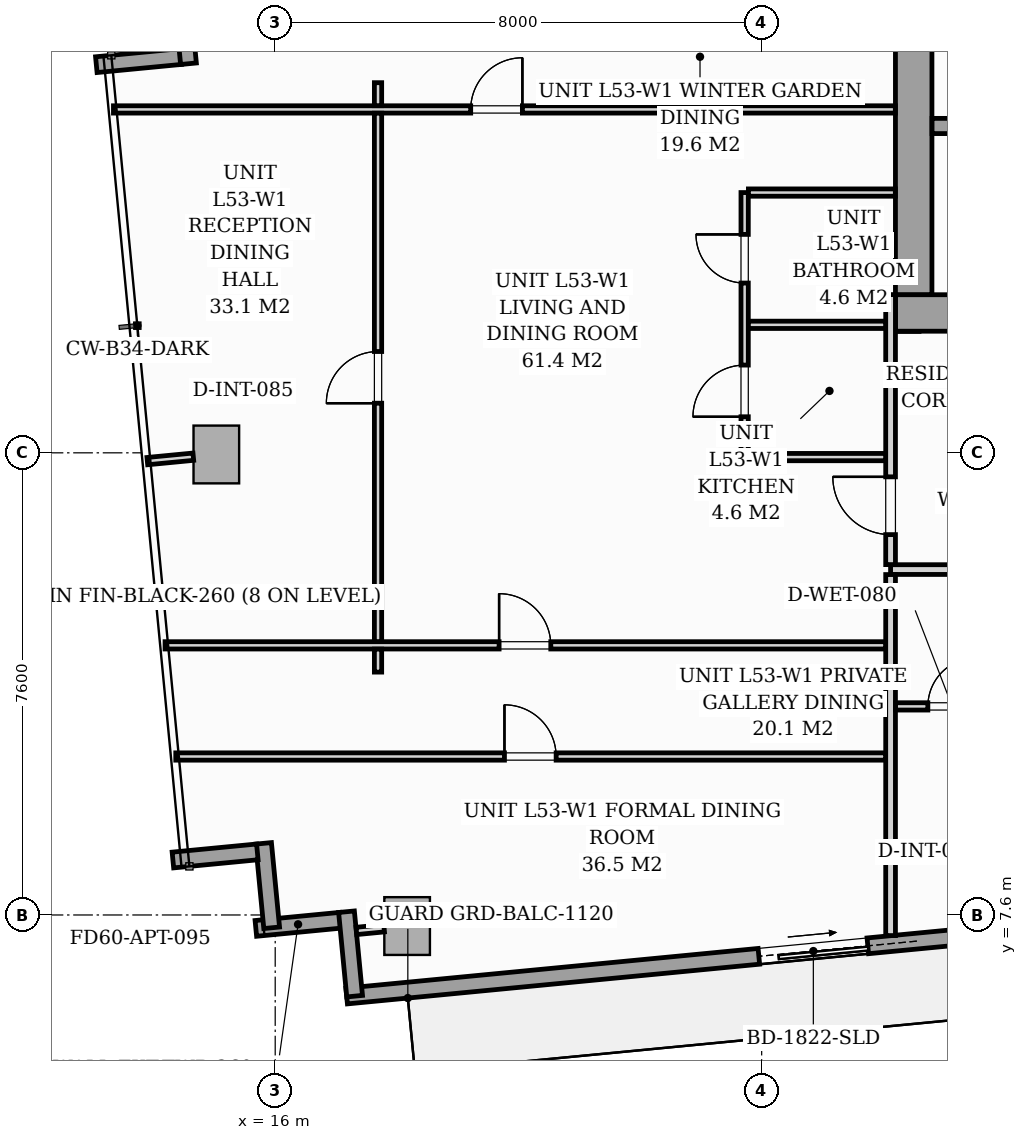
"""IFC4 building model, lengths in metres.
Left out: names, types, materials, properties, quantities, classifications, styles, units other than length and angle.
Written with IfcOpenShell. Run it as: python <this file> out.ifc"""

import sys

from ifc_helpers import new_model, si_unit, direction, frame, frame_2d, origin, origin_2d, place, context, subcontext, project, spatial, rectangle, i_section, extrude, source, transform, mapped, element, fill, save


model = new_model("IFC4")
c1 = context("Model", 3, precision=1e-05, world=origin(), true_north=direction((0.0, 1.0)))
c2 = subcontext(c1, "Body", "Model", "MODEL_VIEW")
j1 = project(units=[si_unit("LENGTHUNIT", "METRE"), si_unit("PLANEANGLEUNIT", "RADIAN")], contexts=[c1])
p1 = place(None, origin())
s1 = spatial("IfcSite", under=j1, at=p1, CompositionType="ELEMENT")
p2 = place(p1, origin())
s2 = spatial("IfcBuilding", under=s1, at=p2, CompositionType="ELEMENT")
p3 = place(p2, frame((0.0, 0.0, 185.8)))
s3 = spatial("IfcBuildingStorey", under=s2, at=p3, CompositionType="ELEMENT", Elevation=185.8)
m1 = source(origin(), c2, "Body", "SweptSolid", [
    extrude(i_section(OverallWidth=0.416, OverallDepth=0.446, WebThickness=0.039, FlangeThickness=0.063, FilletRadius=0.018, at=origin_2d()), origin(), (0.0, 0.0, 1.0), 3.196),
])
p4 = place(p3, frame((26.4, 17.4, 0.002), z_axis=(0.0, 0.0, 1.0), x_axis=(1.0, 0.0, 0.0)))
e1 = element("IfcColumn", 1, at=p4, inside=s3, PredefinedType="PILASTER", context=c2, shape_type="MappedRepresentation", body=[
    mapped(m1, transform((0.0, 0.0, 0.0), scale=1.0)),
])
m2 = source(origin(), c2, "Body", "SweptSolid", [
    extrude(rectangle(XDim=0.75, YDim=0.95, at=origin_2d()), origin(), (0.0, 0.0, 1.0), 3.196),
])
for number, where, z_axis, x_axis in (
    (2, (18.169, 7.418, 0.002), (0.0, 0.0, 1.0), (0.995, 0.096, 0.0)),
    (3, (15.032, 15.173, 0.002), (0.0, 0.0, 1.0), (0.995, 0.096, 0.0)),
):
    element("IfcColumn", number, at=place(p3, frame(where, z_axis=z_axis, x_axis=x_axis)), inside=s3, PredefinedType="COLUMN", context=c2, shape_type="MappedRepresentation", body=[
        mapped(m2, transform((0.0, 0.0, 0.0), scale=1.0)),
    ])
p5 = place(p3, frame((17.07, 7.513, 0.0), z_axis=(0.0, 0.0, 1.0), x_axis=(-0.995391056452, -0.09589913835, 0.0)))
e4 = element("IfcWall", 4, at=p5, inside=s3, PredefinedType="STANDARD", context=c2, shape_type="SweptSolid", body=[
    extrude(rectangle(XDim=1.395, YDim=0.26, at=frame_2d((0.698, 0.0))), origin(), (0.0, 0.0, 1.0), 2.94),
])
p6 = place(p3, frame((15.942, 7.389, 0.0), z_axis=(0.0, 0.0, 1.0), x_axis=(-0.095742423056, 0.99540614245, 0.0)))
e5 = element("IfcWall", 5, at=p6, inside=s3, PredefinedType="STANDARD", context=c2, shape_type="SweptSolid", body=[
    extrude(rectangle(XDim=1.395, YDim=0.26, at=frame_2d((0.697, 0.0))), origin(), (0.0, 0.0, 1.0), 2.94),
])
for number, where, z_axis, x_axis in (
    (6, (15.706, 8.637, 0.0), (0.0, 0.0, 1.0), (-0.995, -0.096, 0.0)),
    (7, (13.058, 21.583, 0.0), (0.0, 0.0, 1.0), (0.995, 0.096, 0.0)),
):
    element("IfcWall", number, at=place(p3, frame(where, z_axis=z_axis, x_axis=x_axis)), inside=s3, PredefinedType="STANDARD", context=c2, shape_type="SweptSolid", body=[
        extrude(rectangle(XDim=1.395, YDim=0.26, at=frame_2d((0.698, 0.0))), origin(), (0.0, 0.0, 1.0), 2.94),
    ])
p7 = place(p3, frame((14.574, 21.599, 0.0), z_axis=(0.0, 0.0, 1.0), x_axis=(-0.095742423056, 0.99540614245, 0.0)))
e8 = element("IfcWall", 8, at=p7, inside=s3, PredefinedType="STANDARD", context=c2, shape_type="SweptSolid", body=[
    extrude(rectangle(XDim=1.395, YDim=0.26, at=frame_2d((0.697, 0.0))), origin(), (0.0, 0.0, 1.0), 2.94),
])
p8 = place(p3, frame((33.201, 7.81, 0.0), z_axis=(0.0, 0.0, 1.0), x_axis=(-0.995397074604, -0.095836652014, 0.0)))
e9 = element("IfcWall", 9, at=p8, inside=s3, PredefinedType="STANDARD", context=c2, shape_type="SweptSolid", body=[
    extrude(rectangle(XDim=16.1, YDim=0.26, at=frame_2d((8.05, 0.0))), origin(), (0.0, 0.0, 1.0), 2.94),
])
p9 = place(p8, frame((7.49, 0.0, 0.0)))
e10 = element("IfcOpeningElement", 10, at=p9, cuts=e9, PredefinedType="OPENING", context=c2, shape_type="SweptSolid", body=[
    extrude(rectangle(XDim=1.8, YDim=2.06, at=frame_2d((0.9, 1.03))), frame((0.0, 0.14, 0.0), z_axis=(0.0, -1.0, 0.0), x_axis=(1.0, 0.0, 0.0)), (0.0, 0.0, 1.0), 0.28),
])
p10 = place(p8, frame((1.15, 0.0, 0.65)))
e11 = element("IfcOpeningElement", 11, at=p10, cuts=e9, PredefinedType="OPENING", context=c2, shape_type="SweptSolid", body=[
    extrude(rectangle(XDim=1.6, YDim=1.5, at=frame_2d((0.8, 0.75))), frame((0.0, 0.14, 0.0), z_axis=(0.0, -1.0, 0.0), x_axis=(1.0, 0.0, 0.0)), (0.0, 0.0, 1.0), 0.28),
])
p11 = place(p3, frame((17.306, 6.265, 0.0), z_axis=(0.0, 0.0, 1.0), x_axis=(-0.095915846097, 0.995389446633, 0.0)))
e12 = element("IfcWall", 12, at=p11, inside=s3, PredefinedType="STANDARD", context=c2, shape_type="SweptSolid", body=[
    extrude(rectangle(XDim=1.395, YDim=0.26, at=frame_2d((0.697, 0.0))), origin(), (0.0, 0.0, 1.0), 2.94),
])
p12 = place(p3, frame((26.2, 17.5, 0.0), z_axis=(0.0, 0.0, 1.0), x_axis=(1.0, 0.0, 0.0)))
e13 = element("IfcWall", 13, at=p12, inside=s3, PredefinedType="SHEAR", context=c2, shape_type="SweptSolid", body=[
    extrude(rectangle(XDim=19.6, YDim=0.6, at=frame_2d((9.8, 0.0))), origin(), (0.0, 0.0, 1.0), 3.2),
])
p13 = place(p12, frame((0.95, 0.0, 0.0)))
e14 = element("IfcOpeningElement", 14, at=p13, cuts=e13, PredefinedType="OPENING", context=c2, shape_type="SweptSolid", body=[
    extrude(rectangle(XDim=0.95, YDim=2.06, at=frame_2d((0.475, 1.03))), frame((0.0, 0.31, 0.0), z_axis=(0.0, -1.0, 0.0), x_axis=(1.0, 0.0, 0.0)), (0.0, 0.0, 1.0), 0.62),
])
p14 = place(p12, frame((9.38, 0.0, 0.0)))
e15 = element("IfcOpeningElement", 15, at=p14, cuts=e13, PredefinedType="OPENING", context=c2, shape_type="SweptSolid", body=[
    extrude(rectangle(XDim=0.85, YDim=2.0, at=frame_2d((0.425, 1.0))), frame((0.0, 0.31, 0.0), z_axis=(0.0, -1.0, 0.0), x_axis=(1.0, 0.0, 0.0)), (0.0, 0.0, 1.0), 0.62),
])
p15 = place(p12, frame((17.55, 0.0, 0.0)))
e16 = element("IfcOpeningElement", 16, at=p15, cuts=e13, PredefinedType="OPENING", context=c2, shape_type="SweptSolid", body=[
    extrude(rectangle(XDim=0.95, YDim=2.06, at=frame_2d((0.475, 1.03))), frame((0.0, 0.31, 0.0), z_axis=(0.0, -1.0, 0.0), x_axis=(1.0, 0.0, 0.0)), (0.0, 0.0, 1.0), 0.62),
])
p16 = place(p3, frame((26.5, 17.802, 0.0), z_axis=(0.0, 0.0, 1.0), x_axis=(0.0, 1.0, 0.0)))
e17 = element("IfcWall", 17, at=p16, inside=s3, PredefinedType="SHEAR", context=c2, shape_type="SweptSolid", body=[
    extrude(rectangle(XDim=5.796, YDim=0.6, at=frame_2d((2.898, 0.0))), origin(), (0.0, 0.0, 1.0), 3.2),
])
p17 = place(p3, frame((26.802, 20.575, 0.0), z_axis=(0.0, 0.0, 1.0), x_axis=(1.0, 0.0, 0.0)))
e18 = element("IfcWall", 18, at=p17, inside=s3, PredefinedType="SOLIDWALL", context=c2, shape_type="SweptSolid", body=[
    extrude(rectangle(XDim=8.148, YDim=0.25, at=frame_2d((4.074, 0.0))), origin(), (0.0, 0.0, 1.0), 3.2),
])
p18 = place(p17, frame((0.298, 0.0, 0.0)))
e19 = element("IfcOpeningElement", 19, at=p18, cuts=e18, PredefinedType="OPENING", context=c2, shape_type="SweptSolid", body=[
    extrude(rectangle(XDim=0.95, YDim=2.06, at=frame_2d((0.475, 1.03))), frame((0.0, 0.135, 0.0), z_axis=(0.0, -1.0, 0.0), x_axis=(1.0, 0.0, 0.0)), (0.0, 0.0, 1.0), 0.27),
])
p19 = place(p3, frame((26.12, 13.28, 0.0), z_axis=(0.0, 0.0, 1.0), x_axis=(1.0, 0.0, 0.0)))
e20 = element("IfcWall", 20, at=p19, inside=s3, PredefinedType="PARTITIONING", context=c2, shape_type="SweptSolid", body=[
    extrude(rectangle(XDim=21.33, YDim=0.16, at=frame_2d((10.665, 0.0))), origin(), (0.0, 0.0, 1.0), 2.94),
])
p20 = place(p19, frame((4.704, 0.0, 0.0)))
e21 = element("IfcOpeningElement", 21, at=p20, cuts=e20, PredefinedType="OPENING", context=c2, shape_type="SweptSolid", body=[
    extrude(rectangle(XDim=0.95, YDim=2.06, at=frame_2d((0.475, 1.03))), frame((0.0, 0.09, 0.0), z_axis=(0.0, -1.0, 0.0), x_axis=(1.0, 0.0, 0.0)), (0.0, 0.0, 1.0), 0.18),
])
p21 = place(p19, frame((11.6, 0.0, 0.0)))
e22 = element("IfcOpeningElement", 22, at=p21, cuts=e20, PredefinedType="OPENING", context=c2, shape_type="SweptSolid", body=[
    extrude(rectangle(XDim=0.95, YDim=2.06, at=frame_2d((0.475, 1.03))), frame((0.0, 0.09, 0.0), z_axis=(0.0, -1.0, 0.0), x_axis=(1.0, 0.0, 0.0)), (0.0, 0.0, 1.0), 0.18),
])
p22 = place(p19, frame((14.976, 0.0, 0.0)))
e23 = element("IfcOpeningElement", 23, at=p22, cuts=e20, PredefinedType="OPENING", context=c2, shape_type="SweptSolid", body=[
    extrude(rectangle(XDim=0.95, YDim=2.06, at=frame_2d((0.475, 1.03))), frame((0.0, 0.09, 0.0), z_axis=(0.0, -1.0, 0.0), x_axis=(1.0, 0.0, 0.0)), (0.0, 0.0, 1.0), 0.18),
])
p23 = place(p3, frame((26.12, 7.261, 0.0), z_axis=(0.0, 0.0, 1.0), x_axis=(0.0, 1.0, 0.0)))
e24 = element("IfcWall", 24, at=p23, inside=s3, PredefinedType="PARTITIONING", context=c2, shape_type="SweptSolid", body=[
    extrude(rectangle(XDim=5.937, YDim=0.16, at=frame_2d((2.968, 0.0))), origin(), (0.0, 0.0, 1.0), 2.94),
])
p24 = place(p3, frame((26.12, 13.362, 0.0), z_axis=(0.0, 0.0, 1.0), x_axis=(0.0, 1.0, 0.0)))
e25 = element("IfcWall", 25, at=p24, inside=s3, PredefinedType="PARTITIONING", context=c2, shape_type="SweptSolid", body=[
    extrude(rectangle(XDim=4.44, YDim=0.16, at=frame_2d((2.22, 0.0))), origin(), (0.0, 0.0, 1.0), 2.94),
])
p25 = place(p24, frame((0.493, 0.0, 0.0)))
e26 = element("IfcOpeningElement", 26, at=p25, cuts=e25, PredefinedType="OPENING", context=c2, shape_type="SweptSolid", body=[
    extrude(rectangle(XDim=0.95, YDim=2.06, at=frame_2d((0.475, 1.03))), frame((0.0, 0.09, 0.0), z_axis=(0.0, -1.0, 0.0), x_axis=(1.0, 0.0, 0.0)), (0.0, 0.0, 1.0), 0.18),
])
p26 = place(p3, frame((26.202, 11.03, 0.0), z_axis=(0.0, 0.0, 1.0), x_axis=(1.0, 0.0, 0.0)))
e27 = element("IfcWall", 27, at=p26, inside=s3, PredefinedType="PARTITIONING", context=c2, shape_type="SweptSolid", body=[
    extrude(rectangle(XDim=3.978, YDim=0.12, at=frame_2d((1.989, 0.0))), origin(), (0.0, 0.0, 1.0), 2.94),
])
p27 = place(p26, frame((0.531, 0.0, 0.0)))
e28 = element("IfcOpeningElement", 28, at=p27, cuts=e27, PredefinedType="OPENING", context=c2, shape_type="SweptSolid", body=[
    extrude(rectangle(XDim=0.8, YDim=2.02, at=frame_2d((0.4, 1.01))), frame((0.0, 0.07, 0.0), z_axis=(0.0, -1.0, 0.0), x_axis=(1.0, 0.0, 0.0)), (0.0, 0.0, 1.0), 0.14),
])
p28 = place(p26, frame((2.496, 0.0, 0.0)))
e29 = element("IfcOpeningElement", 29, at=p28, cuts=e27, PredefinedType="OPENING", context=c2, shape_type="SweptSolid", body=[
    extrude(rectangle(XDim=0.85, YDim=2.05, at=frame_2d((0.425, 1.025))), frame((0.0, 0.07, 0.0), z_axis=(0.0, -1.0, 0.0), x_axis=(1.0, 0.0, 0.0)), (0.0, 0.0, 1.0), 0.14),
])
p29 = place(p3, frame((23.72, 15.13, 0.0), z_axis=(0.0, 0.0, 1.0), x_axis=(0.0, 1.0, 0.0)))
e30 = element("IfcWall", 30, at=p29, inside=s3, PredefinedType="PARTITIONING", context=c2, shape_type="SweptSolid", body=[
    extrude(rectangle(XDim=4.35, YDim=0.12, at=frame_2d((2.175, 0.0))), origin(), (0.0, 0.0, 1.0), 2.94),
])
p30 = place(p29, frame((0.663, 0.0, 0.0)))
e31 = element("IfcOpeningElement", 31, at=p30, cuts=e30, PredefinedType="OPENING", context=c2, shape_type="SweptSolid", body=[
    extrude(rectangle(XDim=0.85, YDim=2.05, at=frame_2d((0.425, 1.025))), frame((0.0, 0.07, 0.0), z_axis=(0.0, -1.0, 0.0), x_axis=(1.0, 0.0, 0.0)), (0.0, 0.0, 1.0), 0.14),
])
p31 = place(p29, frame((2.862, 0.0, 0.0)))
e32 = element("IfcOpeningElement", 32, at=p31, cuts=e30, PredefinedType="OPENING", context=c2, shape_type="SweptSolid", body=[
    extrude(rectangle(XDim=0.8, YDim=2.02, at=frame_2d((0.4, 1.01))), frame((0.0, 0.07, 0.0), z_axis=(0.0, -1.0, 0.0), x_axis=(1.0, 0.0, 0.0)), (0.0, 0.0, 1.0), 0.14),
])
p32 = place(p3, frame((23.782, 17.305, 0.0), z_axis=(0.0, 0.0, 1.0), x_axis=(1.0, 0.0, 0.0)))
e33 = element("IfcWall", 33, at=p32, inside=s3, PredefinedType="PARTITIONING", context=c2, shape_type="SweptSolid", body=[
    extrude(rectangle(XDim=2.256, YDim=0.12, at=frame_2d((1.128, 0.0))), origin(), (0.0, 0.0, 1.0), 2.281),
])
p33 = place(p3, frame((23.782, 15.13, 0.0), z_axis=(0.0, 0.0, 1.0), x_axis=(1.0, 0.0, 0.0)))
e34 = element("IfcWall", 34, at=p33, inside=s3, PredefinedType="PARTITIONING", context=c2, shape_type="SweptSolid", body=[
    extrude(rectangle(XDim=2.256, YDim=0.12, at=frame_2d((1.128, 0.0))), origin(), (0.0, 0.0, 1.0), 2.94),
])
p34 = place(p3, frame((23.782, 19.48, 0.0), z_axis=(0.0, 0.0, 1.0), x_axis=(1.0, 0.0, 0.0)))
e35 = element("IfcWall", 35, at=p34, inside=s3, PredefinedType="PARTITIONING", context=c2, shape_type="SweptSolid", body=[
    extrude(rectangle(XDim=2.416, YDim=0.12, at=frame_2d((1.208, 0.0))), origin(), (0.0, 0.0, 1.0), 2.94),
])
p35 = place(p3, frame((14.365, 10.206, 0.0), z_axis=(0.0, 0.0, 1.0), x_axis=(1.0, 0.0, 0.0)))
e36 = element("IfcWall", 36, at=p35, inside=s3, PredefinedType="PARTITIONING", context=c2, shape_type="SweptSolid", body=[
    extrude(rectangle(XDim=11.673, YDim=0.12, at=frame_2d((5.837, 0.0))), origin(), (0.0, 0.0, 1.0), 2.94),
])
p36 = place(p35, frame((5.405, 0.0, 0.0)))
e37 = element("IfcOpeningElement", 37, at=p36, cuts=e36, PredefinedType="OPENING", context=c2, shape_type="SweptSolid", body=[
    extrude(rectangle(XDim=0.85, YDim=2.05, at=frame_2d((0.425, 1.025))), frame((0.0, 0.07, 0.0), z_axis=(0.0, -1.0, 0.0), x_axis=(1.0, 0.0, 0.0)), (0.0, 0.0, 1.0), 0.14),
])
p37 = place(p3, frame((14.189, 12.034, 0.0), z_axis=(0.0, 0.0, 1.0), x_axis=(1.0, 0.0, 0.0)))
e38 = element("IfcWall", 38, at=p37, inside=s3, PredefinedType="PARTITIONING", context=c2, shape_type="SweptSolid", body=[
    extrude(rectangle(XDim=11.849, YDim=0.12, at=frame_2d((5.925, 0.0))), origin(), (0.0, 0.0, 1.0), 2.94),
])
p38 = place(p37, frame((5.493, 0.0, 0.0)))
e39 = element("IfcOpeningElement", 39, at=p38, cuts=e38, PredefinedType="OPENING", context=c2, shape_type="SweptSolid", body=[
    extrude(rectangle(XDim=0.85, YDim=2.05, at=frame_2d((0.425, 1.025))), frame((0.0, 0.07, 0.0), z_axis=(0.0, -1.0, 0.0), x_axis=(1.0, 0.0, 0.0)), (0.0, 0.0, 1.0), 0.14),
])
p39 = place(p3, frame((13.34, 20.847, 0.0), z_axis=(0.0, 0.0, 1.0), x_axis=(1.0, 0.0, 0.0)))
e40 = element("IfcWall", 40, at=p39, inside=s3, PredefinedType="PARTITIONING", context=c2, shape_type="SweptSolid", body=[
    extrude(rectangle(XDim=12.858, YDim=0.12, at=frame_2d((6.429, 0.0))), origin(), (0.0, 0.0, 1.0), 2.94),
])
p40 = place(p39, frame((5.875, 0.0, 0.0)))
e41 = element("IfcOpeningElement", 41, at=p40, cuts=e40, PredefinedType="OPENING", context=c2, shape_type="SweptSolid", body=[
    extrude(rectangle(XDim=0.85, YDim=2.05, at=frame_2d((0.425, 1.025))), frame((0.0, 0.07, 0.0), z_axis=(0.0, -1.0, 0.0), x_axis=(1.0, 0.0, 0.0)), (0.0, 0.0, 1.0), 0.14),
])
p41 = place(p3, frame((17.691, 11.594, 0.0), z_axis=(0.0, 0.0, 1.0), x_axis=(0.0, 1.0, 0.0)))
e42 = element("IfcWall", 42, at=p41, inside=s3, PredefinedType="PARTITIONING", context=c2, shape_type="SweptSolid", body=[
    extrude(rectangle(XDim=0.378, YDim=0.12, at=frame_2d((0.189, 0.0))), origin(), (0.0, 0.0, 1.0), 2.94),
])
p42 = place(p3, frame((17.691, 12.096, 0.0), z_axis=(0.0, 0.0, 1.0), x_axis=(0.0, 1.0, 0.0)))
e43 = element("IfcWall", 43, at=p42, inside=s3, PredefinedType="PARTITIONING", context=c2, shape_type="SweptSolid", body=[
    extrude(rectangle(XDim=8.689, YDim=0.12, at=frame_2d((4.344, 0.0))), origin(), (0.0, 0.0, 1.0), 2.94),
])
p43 = place(p42, frame((3.92, 0.0, 0.0)))
e44 = element("IfcOpeningElement", 44, at=p43, cuts=e43, PredefinedType="OPENING", context=c2, shape_type="SweptSolid", body=[
    extrude(rectangle(XDim=0.85, YDim=2.05, at=frame_2d((0.425, 1.025))), frame((0.0, 0.07, 0.0), z_axis=(0.0, -1.0, 0.0), x_axis=(1.0, 0.0, 0.0)), (0.0, 0.0, 1.0), 0.14),
])
p44 = place(p3, frame((17.691, 20.909, 0.0), z_axis=(0.0, 0.0, 1.0), x_axis=(0.0, 1.0, 0.0)))
e45 = element("IfcWall", 45, at=p44, inside=s3, PredefinedType="PARTITIONING", context=c2, shape_type="SweptSolid", body=[
    extrude(rectangle(XDim=0.378, YDim=0.12, at=frame_2d((0.189, 0.0))), origin(), (0.0, 0.0, 1.0), 2.94),
])
p45 = place(p3, frame((17.791, 7.382, 0.0), z_axis=(0.0, 0.0, 1.0), x_axis=(-0.995384576284, -0.09596637586, 0.0)))
e46 = element("IfcWall", 46, at=p45, inside=s3, PredefinedType="PARTITIONING", context=c2, shape_type="SweptSolid", body=[
    extrude(rectangle(XDim=0.458, YDim=0.12, at=frame_2d((0.229, 0.0))), origin(), (0.0, 0.0, 1.0), 2.94),
])
p46 = place(p3, frame((14.654, 15.136, 0.0), z_axis=(0.0, 0.0, 1.0), x_axis=(-0.995408440582, -0.095718527039, 0.0)))
e47 = element("IfcWall", 47, at=p46, inside=s3, PredefinedType="PARTITIONING", context=c2, shape_type="SweptSolid", body=[
    extrude(rectangle(XDim=0.76, YDim=0.12, at=frame_2d((0.38, 0.0))), origin(), (0.0, 0.0, 1.0), 2.94),
])
m3 = source(origin(), c2, "Body", "SweptSolid", [
    extrude(rectangle(XDim=1.8, YDim=2.06, at=frame_2d((0.9, 1.03))), frame((0.0, 0.025, 0.0), z_axis=(0.0, -1.0, 0.0), x_axis=(1.0, 0.0, 0.0)), (0.0, 0.0, 1.0), 0.05),
])
p47 = place(p9, origin())
e48 = element("IfcDoor", 48, at=p47, inside=s3, OperationType="SLIDING_TO_LEFT", PredefinedType="DOOR", context=c2, shape_type="MappedRepresentation", body=[
    mapped(m3, transform((0.0, 0.0, 0.0), scale=1.0)),
])
fill(e10, e48)
m4 = source(origin(), c2, "Body", "SweptSolid", [
    extrude(rectangle(XDim=0.8, YDim=2.02, at=frame_2d((0.4, 1.01))), frame((0.0, 0.025, 0.0), z_axis=(0.0, -1.0, 0.0), x_axis=(1.0, 0.0, 0.0)), (0.0, 0.0, 1.0), 0.05),
])
p48 = place(p27, origin())
e49 = element("IfcDoor", 49, at=p48, inside=s3, OperationType="SINGLE_SWING_RIGHT", PredefinedType="DOOR", context=c2, shape_type="MappedRepresentation", body=[
    mapped(m4, transform((0.0, 0.0, 0.0), scale=1.0)),
])
fill(e28, e49)
m5 = source(origin(), c2, "Body", "SweptSolid", [
    extrude(rectangle(XDim=0.95, YDim=2.06, at=frame_2d((0.475, 1.03))), frame((0.0, 0.025, 0.0), z_axis=(0.0, -1.0, 0.0), x_axis=(1.0, 0.0, 0.0)), (0.0, 0.0, 1.0), 0.05),
])
p49 = place(p25, origin())
e50 = element("IfcDoor", 50, at=p49, inside=s3, OperationType="SINGLE_SWING_RIGHT", PredefinedType="DOOR", context=c2, shape_type="MappedRepresentation", body=[
    mapped(m5, transform((0.0, 0.0, 0.0), scale=1.0)),
])
fill(e26, e50)
m6 = source(origin(), c2, "Body", "SweptSolid", [
    extrude(rectangle(XDim=0.85, YDim=2.05, at=frame_2d((0.425, 1.025))), frame((0.0, 0.025, 0.0), z_axis=(0.0, -1.0, 0.0), x_axis=(1.0, 0.0, 0.0)), (0.0, 0.0, 1.0), 0.05),
])
p50 = place(p30, origin())
e51 = element("IfcDoor", 51, at=p50, inside=s3, OperationType="SINGLE_SWING_LEFT", PredefinedType="DOOR", context=c2, shape_type="MappedRepresentation", body=[
    mapped(m6, transform((0.0, 0.0, 0.0), scale=1.0)),
])
fill(e31, e51)
p51 = place(p31, origin())
e52 = element("IfcDoor", 52, at=p51, inside=s3, OperationType="SINGLE_SWING_RIGHT", PredefinedType="DOOR", context=c2, shape_type="MappedRepresentation", body=[
    mapped(m4, transform((0.0, 0.0, 0.0), scale=1.0)),
])
fill(e32, e52)
p52 = place(p36, origin())
e53 = element("IfcDoor", 53, at=p52, inside=s3, OperationType="SINGLE_SWING_LEFT", PredefinedType="DOOR", context=c2, shape_type="MappedRepresentation", body=[
    mapped(m6, transform((0.0, 0.0, 0.0), scale=1.0)),
])
fill(e37, e53)
p53 = place(p38, origin())
e54 = element("IfcDoor", 54, at=p53, inside=s3, OperationType="SINGLE_SWING_LEFT", PredefinedType="DOOR", context=c2, shape_type="MappedRepresentation", body=[
    mapped(m6, transform((0.0, 0.0, 0.0), scale=1.0)),
])
fill(e39, e54)
p54 = place(p40, origin())
e55 = element("IfcDoor", 55, at=p54, inside=s3, OperationType="SINGLE_SWING_RIGHT", PredefinedType="DOOR", context=c2, shape_type="MappedRepresentation", body=[
    mapped(m6, transform((0.0, 0.0, 0.0), scale=1.0)),
])
fill(e41, e55)
p55 = place(p43, origin())
e56 = element("IfcDoor", 56, at=p55, inside=s3, OperationType="SINGLE_SWING_LEFT", PredefinedType="DOOR", context=c2, shape_type="MappedRepresentation", body=[
    mapped(m6, transform((0.0, 0.0, 0.0), scale=1.0)),
])
fill(e44, e56)
save(model, sys.argv[1])
